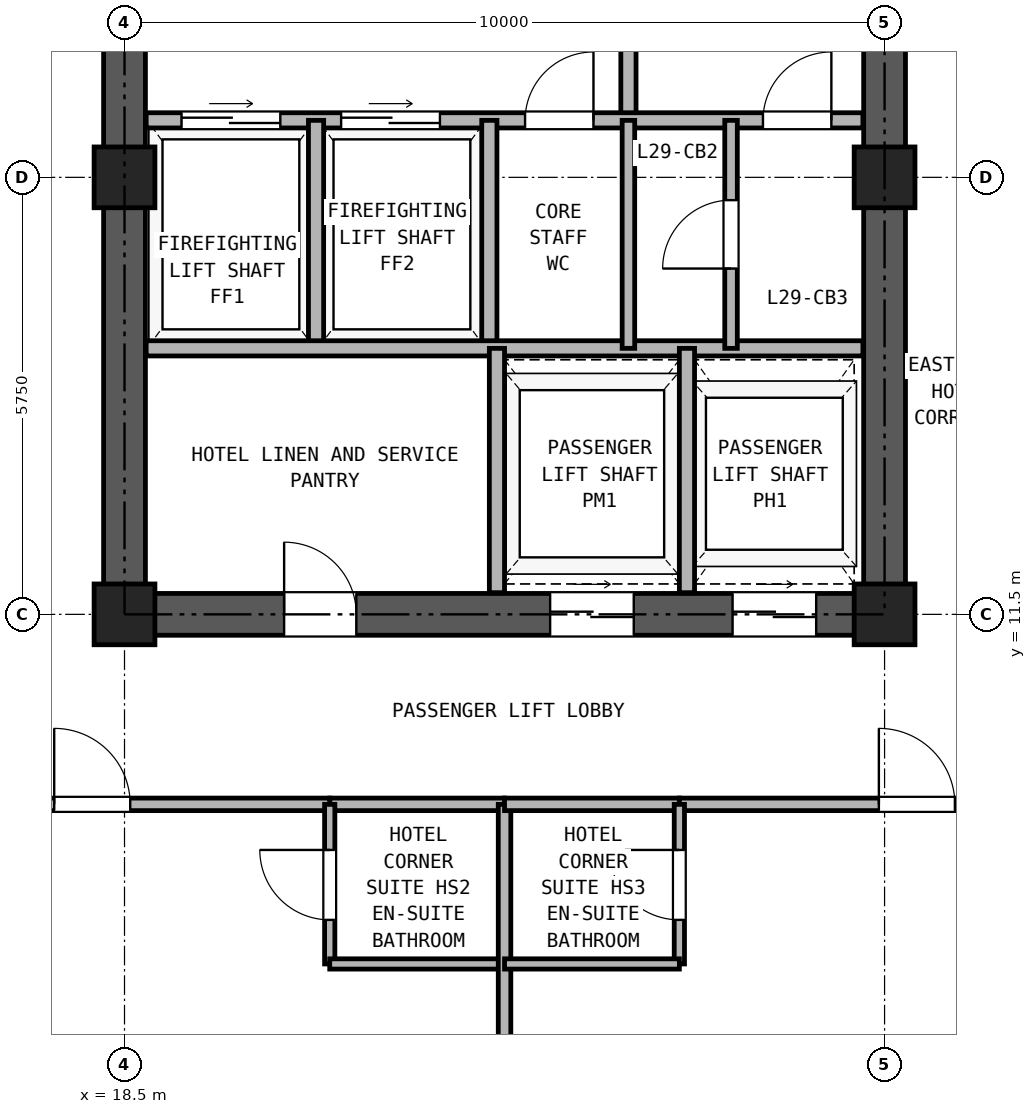
"""IFC4 building model, lengths in metres.
Left out: names, types, materials, properties, quantities, classifications, styles, units other than length and angle.
Written with IfcOpenShell. Run it as: python <this file> out.ifc"""

import sys

from ifc_helpers import new_model, si_unit, direction, frame, frame_2d, origin, origin_2d, place, context, subcontext, project, spatial, rectangle, hollow_rectangle, extrude, source, transform, mapped, element, fill, save


model = new_model("IFC4")
c1 = context("Model", 3, precision=1e-05, world=origin(), true_north=direction((0.0, 1.0)))
c2 = subcontext(c1, "Body", "Model", "MODEL_VIEW")
j1 = project(units=[si_unit("LENGTHUNIT", "METRE"), si_unit("PLANEANGLEUNIT", "RADIAN")], contexts=[c1])
p1 = place(None, origin())
s1 = spatial("IfcSite", under=j1, at=p1, CompositionType="ELEMENT")
p2 = place(p1, origin())
s2 = spatial("IfcBuilding", under=s1, at=p2, CompositionType="ELEMENT")
p3 = place(p2, frame((0.0, 0.0, 108.7)))
s3 = spatial("IfcBuildingStorey", under=s2, at=p3, CompositionType="ELEMENT", Elevation=108.7)
m1 = source(origin(), c2, "Body", "SweptSolid", [
    extrude(hollow_rectangle(XDim=0.8, YDim=0.8, WallThickness=0.045, at=origin_2d()), origin(), (0.0, 0.0, 1.0), 2.95),
])
for number, where, z_axis, x_axis in (
    (1, (18.5, 11.5, 0.0), (0.0, 0.0, 1.0), (1.0, 0.0, 0.0)),
    (2, (18.5, 17.25, 0.0), (0.0, 0.0, 1.0), (1.0, 0.0, 0.0)),
    (3, (28.5, 11.5, 0.0), (0.0, 0.0, 1.0), (1.0, 0.0, 0.0)),
    (4, (28.5, 17.25, 0.0), (0.0, 0.0, 1.0), (1.0, 0.0, 0.0)),
):
    element("IfcColumn", number, at=place(p3, frame(where, z_axis=z_axis, x_axis=x_axis)), inside=s3, PredefinedType="COLUMN", context=c2, shape_type="MappedRepresentation", body=[
        mapped(m1, transform((0.0, 0.0, 0.0), x_axis=(1.0, 0.0, 0.0), y_axis=(0.0, 1.0, 0.0), z_axis=(0.0, 0.0, 1.0), scale=1.0)),
    ])
p4 = place(p3, frame((18.225, 11.5, 0.0), z_axis=(0.0, 0.0, 1.0), x_axis=(1.0, 0.0, 0.0)))
e5 = element("IfcWall", 5, at=p4, inside=s3, PredefinedType="SHEAR", context=c2, shape_type="SweptSolid", body=[
    extrude(rectangle(XDim=10.55, YDim=0.55, at=frame_2d((5.275, 0.0))), origin(), (0.0, 0.0, 1.0), 2.95),
])
p5 = place(p4, frame((2.375, 0.0, 0.0)))
e6 = element("IfcOpeningElement", 6, at=p5, cuts=e5, PredefinedType="OPENING", context=c2, shape_type="SweptSolid", body=[
    extrude(rectangle(XDim=0.95, YDim=2.15, at=frame_2d((0.475, 1.075))), frame((0.0, 0.285, 0.0), z_axis=(0.0, -1.0, 0.0), x_axis=(1.0, 0.0, 0.0)), (0.0, 0.0, 1.0), 0.57),
])
p6 = place(p4, frame((5.875, 0.0, 0.0)))
e7 = element("IfcOpeningElement", 7, at=p6, cuts=e5, PredefinedType="OPENING", context=c2, shape_type="SweptSolid", body=[
    extrude(rectangle(XDim=1.1, YDim=2.25, at=frame_2d((0.55, 1.125))), frame((0.0, 0.285, 0.0), z_axis=(0.0, -1.0, 0.0), x_axis=(1.0, 0.0, 0.0)), (0.0, 0.0, 1.0), 0.57),
])
p7 = place(p4, frame((8.275, 0.0, 0.0)))
e8 = element("IfcOpeningElement", 8, at=p7, cuts=e5, PredefinedType="OPENING", context=c2, shape_type="SweptSolid", body=[
    extrude(rectangle(XDim=1.1, YDim=2.25, at=frame_2d((0.55, 1.125))), frame((0.0, 0.285, 0.0), z_axis=(0.0, -1.0, 0.0), x_axis=(1.0, 0.0, 0.0)), (0.0, 0.0, 1.0), 0.57),
])
p8 = place(p3, frame((18.5, 11.775, 0.0), z_axis=(0.0, 0.0, 1.0), x_axis=(0.0, 1.0, 0.0)))
e9 = element("IfcWall", 9, at=p8, inside=s3, PredefinedType="SHEAR", context=c2, shape_type="SweptSolid", body=[
    extrude(rectangle(XDim=16.7, YDim=0.55, at=frame_2d((8.35, 0.0))), origin(), (0.0, 0.0, 1.0), 2.95),
])
p9 = place(p8, frame((7.375, 0.0, 0.0)))
e10 = element("IfcOpeningElement", 10, at=p9, cuts=e9, PredefinedType="OPENING", context=c2, shape_type="SweptSolid", body=[
    extrude(rectangle(XDim=1.15, YDim=2.2, at=frame_2d((0.575, 1.1))), frame((0.0, 0.285, 0.0), z_axis=(0.0, -1.0, 0.0), x_axis=(1.0, 0.0, 0.0)), (0.0, 0.0, 1.0), 0.57),
])
p10 = place(p3, frame((28.5, 11.775, 0.0), z_axis=(0.0, 0.0, 1.0), x_axis=(0.0, 1.0, 0.0)))
e11 = element("IfcWall", 11, at=p10, inside=s3, PredefinedType="SHEAR", context=c2, shape_type="SweptSolid", body=[
    extrude(rectangle(XDim=16.7, YDim=0.55, at=frame_2d((8.35, 0.0))), origin(), (0.0, 0.0, 1.0), 2.95),
])
p11 = place(p10, frame((7.375, 0.0, 0.0)))
e12 = element("IfcOpeningElement", 12, at=p11, cuts=e11, PredefinedType="OPENING", context=c2, shape_type="SweptSolid", body=[
    extrude(rectangle(XDim=1.15, YDim=2.2, at=frame_2d((0.575, 1.1))), frame((0.0, 0.285, 0.0), z_axis=(0.0, -1.0, 0.0), x_axis=(1.0, 0.0, 0.0)), (0.0, 0.0, 1.0), 0.57),
])
p12 = place(p3, frame((25.13, 18.0, 0.0), z_axis=(0.0, 0.0, 1.0), x_axis=(0.0, 1.0, 0.0)))
e13 = element("IfcWall", 13, at=p12, inside=s3, PredefinedType="PARTITIONING", context=c2, shape_type="SweptSolid", body=[
    extrude(rectangle(XDim=3.39, YDim=0.2, at=frame_2d((1.695, 0.0))), origin(), (0.0, 0.0, 1.0), 2.95),
])
p13 = place(p12, frame((1.1, 0.0, 0.0)))
e14 = element("IfcOpeningElement", 14, at=p13, cuts=e13, PredefinedType="OPENING", context=c2, shape_type="SweptSolid", body=[
    extrude(rectangle(XDim=1.15, YDim=2.2, at=frame_2d((0.575, 1.1))), frame((0.0, 0.11, 0.0), z_axis=(0.0, -1.0, 0.0), x_axis=(1.0, 0.0, 0.0)), (0.0, 0.0, 1.0), 0.22),
])
p14 = place(p3, frame((18.785, 18.0, 0.0), z_axis=(0.0, 0.0, 1.0), x_axis=(1.0, 0.0, 0.0)))
e15 = element("IfcWall", 15, at=p14, inside=s3, PredefinedType="PARTITIONING", context=c2, shape_type="SweptSolid", body=[
    extrude(rectangle(XDim=9.43, YDim=0.2, at=frame_2d((4.715, 0.0))), origin(), (0.0, 0.0, 1.0), 2.95),
])
p15 = place(p14, frame((0.465, 0.0, 0.0)))
e16 = element("IfcOpeningElement", 16, at=p15, cuts=e15, PredefinedType="OPENING", context=c2, shape_type="SweptSolid", body=[
    extrude(rectangle(XDim=1.3, YDim=2.3, at=frame_2d((0.65, 1.15))), frame((0.0, 0.11, 0.0), z_axis=(0.0, -1.0, 0.0), x_axis=(1.0, 0.0, 0.0)), (0.0, 0.0, 1.0), 0.22),
])
p16 = place(p14, frame((2.565, 0.0, 0.0)))
e17 = element("IfcOpeningElement", 17, at=p16, cuts=e15, PredefinedType="OPENING", context=c2, shape_type="SweptSolid", body=[
    extrude(rectangle(XDim=1.3, YDim=2.3, at=frame_2d((0.65, 1.15))), frame((0.0, 0.11, 0.0), z_axis=(0.0, -1.0, 0.0), x_axis=(1.0, 0.0, 0.0)), (0.0, 0.0, 1.0), 0.22),
])
p17 = place(p14, frame((4.985, 0.0, 0.0)))
e18 = element("IfcOpeningElement", 18, at=p17, cuts=e15, PredefinedType="OPENING", context=c2, shape_type="SweptSolid", body=[
    extrude(rectangle(XDim=0.9, YDim=2.05, at=frame_2d((0.45, 1.025))), frame((0.0, 0.11, 0.0), z_axis=(0.0, -1.0, 0.0), x_axis=(1.0, 0.0, 0.0)), (0.0, 0.0, 1.0), 0.22),
])
p18 = place(p14, frame((8.115, 0.0, 0.0)))
e19 = element("IfcOpeningElement", 19, at=p18, cuts=e15, PredefinedType="OPENING", context=c2, shape_type="SweptSolid", body=[
    extrude(rectangle(XDim=0.9, YDim=2.05, at=frame_2d((0.45, 1.025))), frame((0.0, 0.11, 0.0), z_axis=(0.0, -1.0, 0.0), x_axis=(1.0, 0.0, 0.0)), (0.0, 0.0, 1.0), 0.22),
])
for number, where, z_axis, x_axis in (
    (20, (21.02, 15.0, 0.0), (0.0, 0.0, 1.0), (0.0, 1.0, 0.0)),
    (21, (23.3, 15.0, 0.0), (0.0, 0.0, 1.0), (0.0, 1.0, 0.0)),
):
    element("IfcWall", number, at=place(p3, frame(where, z_axis=z_axis, x_axis=x_axis)), inside=s3, PredefinedType="PARTITIONING", context=c2, shape_type="SweptSolid", body=[
        extrude(rectangle(XDim=3.0, YDim=0.2, at=frame_2d((1.5, 0.0))), origin(), (0.0, 0.0, 1.0), 2.95),
    ])
p19 = place(p3, frame((18.785, 15.0, 0.0), z_axis=(0.0, 0.0, 1.0), x_axis=(1.0, 0.0, 0.0)))
e22 = element("IfcWall", 22, at=p19, inside=s3, PredefinedType="PARTITIONING", context=c2, shape_type="SweptSolid", body=[
    extrude(rectangle(XDim=9.43, YDim=0.2, at=frame_2d((4.715, 0.0))), origin(), (0.0, 0.0, 1.0), 2.95),
])
p20 = place(p3, frame((25.13, 15.0, 0.0), z_axis=(0.0, 0.0, 1.0), x_axis=(0.0, 1.0, 0.0)))
e23 = element("IfcWall", 23, at=p20, inside=s3, PredefinedType="PARTITIONING", context=c2, shape_type="SweptSolid", body=[
    extrude(rectangle(XDim=3.0, YDim=0.165, at=frame_2d((1.5, 0.0))), origin(), (0.0, 0.0, 1.0), 2.95),
])
p21 = place(p3, frame((26.48, 15.0, 0.0), z_axis=(0.0, 0.0, 1.0), x_axis=(0.0, 1.0, 0.0)))
e24 = element("IfcWall", 24, at=p21, inside=s3, PredefinedType="PARTITIONING", context=c2, shape_type="SweptSolid", body=[
    extrude(rectangle(XDim=3.0, YDim=0.165, at=frame_2d((1.5, 0.0))), origin(), (0.0, 0.0, 1.0), 2.95),
])
p22 = place(p21, frame((1.05, 0.0, 0.0)))
e25 = element("IfcOpeningElement", 25, at=p22, cuts=e24, PredefinedType="OPENING", context=c2, shape_type="SweptSolid", body=[
    extrude(rectangle(XDim=0.9, YDim=2.05, at=frame_2d((0.45, 1.025))), frame((0.0, 0.093, 0.0), z_axis=(0.0, -1.0, 0.0), x_axis=(1.0, 0.0, 0.0)), (0.0, 0.0, 1.0), 0.185),
])
for number, where, z_axis, x_axis in (
    (26, (23.4, 11.785, 0.0), (0.0, 0.0, 1.0), (0.0, 1.0, 0.0)),
    (27, (25.9, 11.785, 0.0), (0.0, 0.0, 1.0), (0.0, 1.0, 0.0)),
):
    element("IfcWall", number, at=place(p3, frame(where, z_axis=z_axis, x_axis=x_axis)), inside=s3, PredefinedType="PARTITIONING", context=c2, shape_type="SweptSolid", body=[
        extrude(rectangle(XDim=3.215, YDim=0.2, at=frame_2d((1.607, 0.0))), origin(), (0.0, 0.0, 1.0), 2.95),
    ])
p23 = place(p3, frame((21.2, 9.0, 0.0), z_axis=(0.0, 0.0, 1.0), x_axis=(1.0, 0.0, 0.0)))
e28 = element("IfcWall", 28, at=p23, inside=s3, PredefinedType="PARTITIONING", context=c2, shape_type="SweptSolid", body=[
    extrude(rectangle(XDim=2.3, YDim=0.165, at=frame_2d((1.15, 0.0))), origin(), (0.0, 0.0, 1.0), 2.95),
])
p24 = place(p3, frame((14.95, 9.0, 0.0), z_axis=(0.0, 0.0, 1.0), x_axis=(1.0, 0.0, 0.0)))
e29 = element("IfcWall", 29, at=p24, inside=s3, PredefinedType="PARTITIONING", context=c2, shape_type="SweptSolid", body=[
    extrude(rectangle(XDim=6.25, YDim=0.165, at=frame_2d((3.125, 0.0))), origin(), (0.0, 0.0, 1.0), 2.95),
])
p25 = place(p24, frame((2.625, 0.0, 0.0)))
e30 = element("IfcOpeningElement", 30, at=p25, cuts=e29, PredefinedType="OPENING", context=c2, shape_type="SweptSolid", body=[
    extrude(rectangle(XDim=1.0, YDim=2.15, at=frame_2d((0.5, 1.075))), frame((0.0, 0.093, 0.0), z_axis=(0.0, -1.0, 0.0), x_axis=(1.0, 0.0, 0.0)), (0.0, 0.0, 1.0), 0.185),
])
p26 = place(p3, frame((21.2, 6.9, 0.0), z_axis=(0.0, 0.0, 1.0), x_axis=(0.0, 1.0, 0.0)))
e31 = element("IfcWall", 31, at=p26, inside=s3, PredefinedType="PARTITIONING", context=c2, shape_type="SweptSolid", body=[
    extrude(rectangle(XDim=2.1, YDim=0.135, at=frame_2d((1.05, 0.0))), origin(), (0.0, 0.0, 1.0), 2.95),
])
p27 = place(p26, frame((0.58, 0.0, 0.0)))
e32 = element("IfcOpeningElement", 32, at=p27, cuts=e31, PredefinedType="OPENING", context=c2, shape_type="SweptSolid", body=[
    extrude(rectangle(XDim=0.92, YDim=2.1, at=frame_2d((0.46, 1.05))), frame((0.0, 0.077, 0.0), z_axis=(0.0, -1.0, 0.0), x_axis=(1.0, 0.0, 0.0)), (0.0, 0.0, 1.0), 0.155),
])
p28 = place(p3, frame((21.2, 6.9, 0.0), z_axis=(0.0, 0.0, 1.0), x_axis=(1.0, 0.0, 0.0)))
e33 = element("IfcWall", 33, at=p28, inside=s3, PredefinedType="PARTITIONING", context=c2, shape_type="SweptSolid", body=[
    extrude(rectangle(XDim=2.3, YDim=0.135, at=frame_2d((1.15, 0.0))), origin(), (0.0, 0.0, 1.0), 2.95),
])
p29 = place(p3, frame((23.5, 0.16, 0.0), z_axis=(0.0, 0.0, 1.0), x_axis=(0.0, 1.0, 0.0)))
e34 = element("IfcWall", 34, at=p29, inside=s3, PredefinedType="PARTITIONING", context=c2, shape_type="SweptSolid", body=[
    extrude(rectangle(XDim=8.84, YDim=0.165, at=frame_2d((4.42, 0.0))), origin(), (0.0, 0.0, 1.0), 2.95),
])
p30 = place(p3, frame((23.5, 9.0, 0.0), z_axis=(0.0, 0.0, 1.0), x_axis=(1.0, 0.0, 0.0)))
e35 = element("IfcWall", 35, at=p30, inside=s3, PredefinedType="PARTITIONING", context=c2, shape_type="SweptSolid", body=[
    extrude(rectangle(XDim=2.3, YDim=0.165, at=frame_2d((1.15, 0.0))), origin(), (0.0, 0.0, 1.0), 2.95),
])
p31 = place(p3, frame((25.8, 9.0, 0.0), z_axis=(0.0, 0.0, 1.0), x_axis=(1.0, 0.0, 0.0)))
e36 = element("IfcWall", 36, at=p31, inside=s3, PredefinedType="PARTITIONING", context=c2, shape_type="SweptSolid", body=[
    extrude(rectangle(XDim=6.25, YDim=0.165, at=frame_2d((3.125, 0.0))), origin(), (0.0, 0.0, 1.0), 2.95),
])
p32 = place(p31, frame((2.625, 0.0, 0.0)))
e37 = element("IfcOpeningElement", 37, at=p32, cuts=e36, PredefinedType="OPENING", context=c2, shape_type="SweptSolid", body=[
    extrude(rectangle(XDim=1.0, YDim=2.15, at=frame_2d((0.5, 1.075))), frame((0.0, 0.093, 0.0), z_axis=(0.0, -1.0, 0.0), x_axis=(1.0, 0.0, 0.0)), (0.0, 0.0, 1.0), 0.185),
])
p33 = place(p3, frame((25.8, 6.9, 0.0), z_axis=(0.0, 0.0, 1.0), x_axis=(0.0, 1.0, 0.0)))
e38 = element("IfcWall", 38, at=p33, inside=s3, PredefinedType="PARTITIONING", context=c2, shape_type="SweptSolid", body=[
    extrude(rectangle(XDim=2.1, YDim=0.135, at=frame_2d((1.05, 0.0))), origin(), (0.0, 0.0, 1.0), 2.95),
])
p34 = place(p33, frame((0.58, 0.0, 0.0)))
e39 = element("IfcOpeningElement", 39, at=p34, cuts=e38, PredefinedType="OPENING", context=c2, shape_type="SweptSolid", body=[
    extrude(rectangle(XDim=0.92, YDim=2.1, at=frame_2d((0.46, 1.05))), frame((0.0, 0.077, 0.0), z_axis=(0.0, -1.0, 0.0), x_axis=(1.0, 0.0, 0.0)), (0.0, 0.0, 1.0), 0.155),
])
p35 = place(p3, frame((23.5, 6.9, 0.0), z_axis=(0.0, 0.0, 1.0), x_axis=(1.0, 0.0, 0.0)))
e40 = element("IfcWall", 40, at=p35, inside=s3, PredefinedType="PARTITIONING", context=c2, shape_type="SweptSolid", body=[
    extrude(rectangle(XDim=2.3, YDim=0.135, at=frame_2d((1.15, 0.0))), origin(), (0.0, 0.0, 1.0), 2.95),
])
p36 = place(p15, origin())
e41 = element("IfcDoor", 41, at=p36, inside=s3, OperationType="DOUBLE_DOOR_SLIDING", PredefinedType="DOOR", context=c2, shape_type="SweptSolid", body=[
    extrude(rectangle(XDim=1.3, YDim=2.3, at=frame_2d((0.65, 1.15))), frame((0.0, 0.025, 0.0), z_axis=(0.0, -1.0, 0.0), x_axis=(1.0, 0.0, 0.0)), (0.0, 0.0, 1.0), 0.05),
])
fill(e16, e41)
p37 = place(p16, origin())
e42 = element("IfcDoor", 42, at=p37, inside=s3, OperationType="DOUBLE_DOOR_SLIDING", PredefinedType="DOOR", context=c2, shape_type="SweptSolid", body=[
    extrude(rectangle(XDim=1.3, YDim=2.3, at=frame_2d((0.65, 1.15))), frame((0.0, 0.025, 0.0), z_axis=(0.0, -1.0, 0.0), x_axis=(1.0, 0.0, 0.0)), (0.0, 0.0, 1.0), 0.05),
])
fill(e17, e42)
p38 = place(p17, frame((0.9, 0.0, 0.0), z_axis=(0.0, 0.0, 1.0), x_axis=(-1.0, 0.0, 0.0)))
e43 = element("IfcDoor", 43, at=p38, inside=s3, OperationType="SINGLE_SWING_RIGHT", PredefinedType="DOOR", context=c2, shape_type="SweptSolid", body=[
    extrude(rectangle(XDim=0.9, YDim=2.05, at=frame_2d((0.45, 1.025))), frame((0.0, 0.025, 0.0), z_axis=(0.0, -1.0, 0.0), x_axis=(1.0, 0.0, 0.0)), (0.0, 0.0, 1.0), 0.05),
])
fill(e18, e43)
p39 = place(p22, origin())
e44 = element("IfcDoor", 44, at=p39, inside=s3, OperationType="SINGLE_SWING_LEFT", PredefinedType="DOOR", context=c2, shape_type="SweptSolid", body=[
    extrude(rectangle(XDim=0.9, YDim=2.05, at=frame_2d((0.45, 1.025))), frame((0.0, 0.025, 0.0), z_axis=(0.0, -1.0, 0.0), x_axis=(1.0, 0.0, 0.0)), (0.0, 0.0, 1.0), 0.05),
])
fill(e25, e44)
p40 = place(p18, frame((0.9, 0.0, 0.0), z_axis=(0.0, 0.0, 1.0), x_axis=(-1.0, 0.0, 0.0)))
e45 = element("IfcDoor", 45, at=p40, inside=s3, OperationType="SINGLE_SWING_RIGHT", PredefinedType="DOOR", context=c2, shape_type="SweptSolid", body=[
    extrude(rectangle(XDim=0.9, YDim=2.05, at=frame_2d((0.45, 1.025))), frame((0.0, 0.025, 0.0), z_axis=(0.0, -1.0, 0.0), x_axis=(1.0, 0.0, 0.0)), (0.0, 0.0, 1.0), 0.05),
])
fill(e19, e45)
p41 = place(p5, frame((0.95, 0.0, 0.0), z_axis=(0.0, 0.0, 1.0), x_axis=(-1.0, 0.0, 0.0)))
e46 = element("IfcDoor", 46, at=p41, inside=s3, OperationType="SINGLE_SWING_LEFT", PredefinedType="DOOR", context=c2, shape_type="SweptSolid", body=[
    extrude(rectangle(XDim=0.95, YDim=2.15, at=frame_2d((0.475, 1.075))), frame((0.0, 0.025, 0.0), z_axis=(0.0, -1.0, 0.0), x_axis=(1.0, 0.0, 0.0)), (0.0, 0.0, 1.0), 0.05),
])
fill(e6, e46)
p42 = place(p6, frame((1.1, 0.0, 0.0), z_axis=(0.0, 0.0, 1.0), x_axis=(-1.0, 0.0, 0.0)))
e47 = element("IfcDoor", 47, at=p42, inside=s3, OperationType="DOUBLE_DOOR_SLIDING", PredefinedType="DOOR", context=c2, shape_type="SweptSolid", body=[
    extrude(rectangle(XDim=1.1, YDim=2.25, at=frame_2d((0.55, 1.125))), frame((0.0, 0.025, 0.0), z_axis=(0.0, -1.0, 0.0), x_axis=(1.0, 0.0, 0.0)), (0.0, 0.0, 1.0), 0.05),
])
fill(e7, e47)
p43 = place(p7, frame((1.1, 0.0, 0.0), z_axis=(0.0, 0.0, 1.0), x_axis=(-1.0, 0.0, 0.0)))
e48 = element("IfcDoor", 48, at=p43, inside=s3, OperationType="DOUBLE_DOOR_SLIDING", PredefinedType="DOOR", context=c2, shape_type="SweptSolid", body=[
    extrude(rectangle(XDim=1.1, YDim=2.25, at=frame_2d((0.55, 1.125))), frame((0.0, 0.025, 0.0), z_axis=(0.0, -1.0, 0.0), x_axis=(1.0, 0.0, 0.0)), (0.0, 0.0, 1.0), 0.05),
])
fill(e8, e48)
p44 = place(p27, origin())
e49 = element("IfcDoor", 49, at=p44, inside=s3, OperationType="SINGLE_SWING_RIGHT", PredefinedType="DOOR", context=c2, shape_type="SweptSolid", body=[
    extrude(rectangle(XDim=0.92, YDim=2.1, at=frame_2d((0.46, 1.05))), frame((0.0, 0.025, 0.0), z_axis=(0.0, -1.0, 0.0), x_axis=(1.0, 0.0, 0.0)), (0.0, 0.0, 1.0), 0.05),
])
fill(e32, e49)
p45 = place(p25, frame((1.0, 0.0, 0.0), z_axis=(0.0, 0.0, 1.0), x_axis=(-1.0, 0.0, 0.0)))
e50 = element("IfcDoor", 50, at=p45, inside=s3, OperationType="SINGLE_SWING_LEFT", PredefinedType="DOOR", context=c2, shape_type="SweptSolid", body=[
    extrude(rectangle(XDim=1.0, YDim=2.15, at=frame_2d((0.5, 1.075))), frame((0.0, 0.025, 0.0), z_axis=(0.0, -1.0, 0.0), x_axis=(1.0, 0.0, 0.0)), (0.0, 0.0, 1.0), 0.05),
])
fill(e30, e50)
p46 = place(p34, frame((0.92, 0.0, 0.0), z_axis=(0.0, 0.0, 1.0), x_axis=(-1.0, 0.0, 0.0)))
e51 = element("IfcDoor", 51, at=p46, inside=s3, OperationType="SINGLE_SWING_RIGHT", PredefinedType="DOOR", context=c2, shape_type="SweptSolid", body=[
    extrude(rectangle(XDim=0.92, YDim=2.1, at=frame_2d((0.46, 1.05))), frame((0.0, 0.025, 0.0), z_axis=(0.0, -1.0, 0.0), x_axis=(1.0, 0.0, 0.0)), (0.0, 0.0, 1.0), 0.05),
])
fill(e39, e51)
p47 = place(p32, frame((1.0, 0.0, 0.0), z_axis=(0.0, 0.0, 1.0), x_axis=(-1.0, 0.0, 0.0)))
e52 = element("IfcDoor", 52, at=p47, inside=s3, OperationType="SINGLE_SWING_LEFT", PredefinedType="DOOR", context=c2, shape_type="SweptSolid", body=[
    extrude(rectangle(XDim=1.0, YDim=2.15, at=frame_2d((0.5, 1.075))), frame((0.0, 0.025, 0.0), z_axis=(0.0, -1.0, 0.0), x_axis=(1.0, 0.0, 0.0)), (0.0, 0.0, 1.0), 0.05),
])
fill(e37, e52)
save(model, sys.argv[1])
